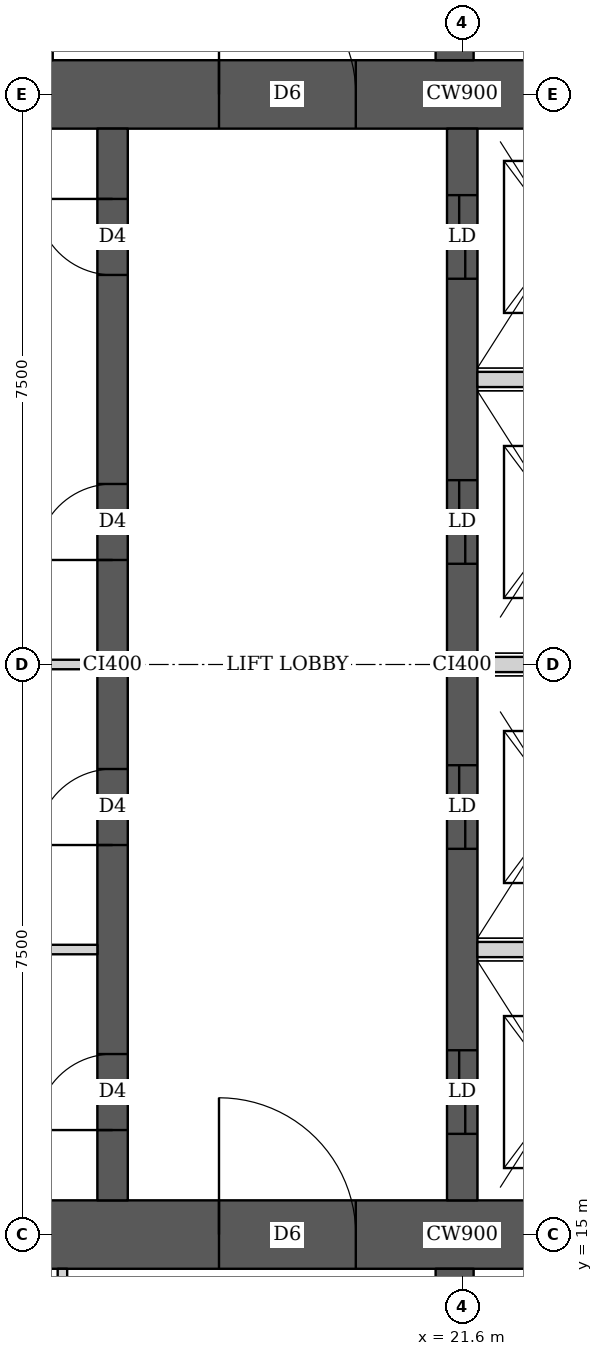
"""IFC4 building model, lengths in metres.
Left out: names, types, materials, properties, quantities, classifications, styles, units other than length and angle.
Written with IfcOpenShell. Run it as: python <this file> out.ifc"""

import sys

from ifc_helpers import new_model, si_unit, direction, frame, frame_2d, origin, place, context, subcontext, project, spatial, rectangle, extrude, element, fill, save


model = new_model("IFC4")
c1 = context("Model", 3, precision=1e-05, world=origin(), true_north=direction((0.0, 1.0)))
c2 = subcontext(c1, "Body", "Model", "MODEL_VIEW")
j1 = project(units=[si_unit("LENGTHUNIT", "METRE"), si_unit("PLANEANGLEUNIT", "RADIAN")], contexts=[c1])
p1 = place(None, origin())
s1 = spatial("IfcSite", under=j1, at=p1, CompositionType="ELEMENT")
p2 = place(p1, origin())
s2 = spatial("IfcBuilding", under=s1, at=p2, CompositionType="ELEMENT")
p3 = place(p2, frame((0.0, 0.0, 139.55)))
s3 = spatial("IfcBuildingStorey", under=s2, at=p3, CompositionType="ELEMENT", Elevation=139.55)
p4 = place(p3, frame((13.95, 15.0, 0.0), z_axis=(0.0, 0.0, 1.0), x_axis=(1.0, 0.0, 0.0)))
e1 = element("IfcWall", 1, at=p4, inside=s3, PredefinedType="SHEAR", context=c2, shape_type="SweptSolid", body=[
    extrude(rectangle(XDim=15.3, YDim=0.9, at=frame_2d((7.65, 0.0))), origin(), (0.0, 0.0, 1.0), 3.75),
])
p5 = place(p4, frame((4.45, 0.0, 0.0)))
e2 = element("IfcOpeningElement", 2, at=p5, cuts=e1, PredefinedType="OPENING", context=c2, shape_type="SweptSolid", body=[
    extrude(rectangle(XDim=1.8, YDim=2.1, at=frame_2d((0.9, 1.05))), frame((0.0, 0.46, 0.0), z_axis=(0.0, -1.0, 0.0), x_axis=(1.0, 0.0, 0.0)), (0.0, 0.0, 1.0), 0.92),
])
p6 = place(p4, frame((10.7, 0.0, 0.0)))
e3 = element("IfcOpeningElement", 3, at=p6, cuts=e1, PredefinedType="OPENING", context=c2, shape_type="SweptSolid", body=[
    extrude(rectangle(XDim=1.1, YDim=2.1, at=frame_2d((0.55, 1.05))), frame((0.0, 0.46, 0.0), z_axis=(0.0, -1.0, 0.0), x_axis=(1.0, 0.0, 0.0)), (0.0, 0.0, 1.0), 0.92),
])
p7 = place(p3, frame((13.95, 30.0, 0.0), z_axis=(0.0, 0.0, 1.0), x_axis=(1.0, 0.0, 0.0)))
e4 = element("IfcWall", 4, at=p7, inside=s3, PredefinedType="SHEAR", context=c2, shape_type="SweptSolid", body=[
    extrude(rectangle(XDim=15.3, YDim=0.9, at=frame_2d((7.65, 0.0))), origin(), (0.0, 0.0, 1.0), 3.75),
])
p8 = place(p7, frame((4.45, 0.0, 0.0)))
e5 = element("IfcOpeningElement", 5, at=p8, cuts=e4, PredefinedType="OPENING", context=c2, shape_type="SweptSolid", body=[
    extrude(rectangle(XDim=1.8, YDim=2.1, at=frame_2d((0.9, 1.05))), frame((0.0, 0.46, 0.0), z_axis=(0.0, -1.0, 0.0), x_axis=(1.0, 0.0, 0.0)), (0.0, 0.0, 1.0), 0.92),
])
p9 = place(p7, frame((10.7, 0.0, 0.0)))
e6 = element("IfcOpeningElement", 6, at=p9, cuts=e4, PredefinedType="OPENING", context=c2, shape_type="SweptSolid", body=[
    extrude(rectangle(XDim=1.1, YDim=2.1, at=frame_2d((0.55, 1.05))), frame((0.0, 0.46, 0.0), z_axis=(0.0, -1.0, 0.0), x_axis=(1.0, 0.0, 0.0)), (0.0, 0.0, 1.0), 0.92),
])
p10 = place(p3, frame((17.0, 15.45, 0.0), z_axis=(0.0, 0.0, 1.0), x_axis=(0.0, 1.0, 0.0)))
e7 = element("IfcWall", 7, at=p10, inside=s3, PredefinedType="SHEAR", context=c2, shape_type="SweptSolid", body=[
    extrude(rectangle(XDim=14.1, YDim=0.4, at=frame_2d((7.05, 0.0))), origin(), (0.0, 0.0, 1.0), 3.75),
])
p11 = place(p10, frame((0.925, 0.0, 0.0)))
e8 = element("IfcOpeningElement", 8, at=p11, cuts=e7, PredefinedType="OPENING", context=c2, shape_type="SweptSolid", body=[
    extrude(rectangle(XDim=1.0, YDim=2.1, at=frame_2d((0.5, 1.05))), frame((0.0, 0.21, 0.0), z_axis=(0.0, -1.0, 0.0), x_axis=(1.0, 0.0, 0.0)), (0.0, 0.0, 1.0), 0.42),
])
p12 = place(p10, frame((4.675, 0.0, 0.0)))
e9 = element("IfcOpeningElement", 9, at=p12, cuts=e7, PredefinedType="OPENING", context=c2, shape_type="SweptSolid", body=[
    extrude(rectangle(XDim=1.0, YDim=2.1, at=frame_2d((0.5, 1.05))), frame((0.0, 0.21, 0.0), z_axis=(0.0, -1.0, 0.0), x_axis=(1.0, 0.0, 0.0)), (0.0, 0.0, 1.0), 0.42),
])
p13 = place(p10, frame((8.425, 0.0, 0.0)))
e10 = element("IfcOpeningElement", 10, at=p13, cuts=e7, PredefinedType="OPENING", context=c2, shape_type="SweptSolid", body=[
    extrude(rectangle(XDim=1.0, YDim=2.1, at=frame_2d((0.5, 1.05))), frame((0.0, 0.21, 0.0), z_axis=(0.0, -1.0, 0.0), x_axis=(1.0, 0.0, 0.0)), (0.0, 0.0, 1.0), 0.42),
])
p14 = place(p10, frame((12.175, 0.0, 0.0)))
e11 = element("IfcOpeningElement", 11, at=p14, cuts=e7, PredefinedType="OPENING", context=c2, shape_type="SweptSolid", body=[
    extrude(rectangle(XDim=1.0, YDim=2.1, at=frame_2d((0.5, 1.05))), frame((0.0, 0.21, 0.0), z_axis=(0.0, -1.0, 0.0), x_axis=(1.0, 0.0, 0.0)), (0.0, 0.0, 1.0), 0.42),
])
p15 = place(p3, frame((21.6, 15.45, 0.0), z_axis=(0.0, 0.0, 1.0), x_axis=(0.0, 1.0, 0.0)))
e12 = element("IfcWall", 12, at=p15, inside=s3, PredefinedType="SHEAR", context=c2, shape_type="SweptSolid", body=[
    extrude(rectangle(XDim=14.1, YDim=0.4, at=frame_2d((7.05, 0.0))), origin(), (0.0, 0.0, 1.0), 3.75),
])
p16 = place(p15, frame((0.875, 0.0, 0.0)))
e13 = element("IfcOpeningElement", 13, at=p16, cuts=e12, PredefinedType="OPENING", context=c2, shape_type="SweptSolid", body=[
    extrude(rectangle(XDim=1.1, YDim=2.1, at=frame_2d((0.55, 1.05))), frame((0.0, 0.21, 0.0), z_axis=(0.0, -1.0, 0.0), x_axis=(1.0, 0.0, 0.0)), (0.0, 0.0, 1.0), 0.42),
])
p17 = place(p15, frame((4.625, 0.0, 0.0)))
e14 = element("IfcOpeningElement", 14, at=p17, cuts=e12, PredefinedType="OPENING", context=c2, shape_type="SweptSolid", body=[
    extrude(rectangle(XDim=1.1, YDim=2.1, at=frame_2d((0.55, 1.05))), frame((0.0, 0.21, 0.0), z_axis=(0.0, -1.0, 0.0), x_axis=(1.0, 0.0, 0.0)), (0.0, 0.0, 1.0), 0.42),
])
p18 = place(p15, frame((8.375, 0.0, 0.0)))
e15 = element("IfcOpeningElement", 15, at=p18, cuts=e12, PredefinedType="OPENING", context=c2, shape_type="SweptSolid", body=[
    extrude(rectangle(XDim=1.1, YDim=2.1, at=frame_2d((0.55, 1.05))), frame((0.0, 0.21, 0.0), z_axis=(0.0, -1.0, 0.0), x_axis=(1.0, 0.0, 0.0)), (0.0, 0.0, 1.0), 0.42),
])
p19 = place(p15, frame((12.125, 0.0, 0.0)))
e16 = element("IfcOpeningElement", 16, at=p19, cuts=e12, PredefinedType="OPENING", context=c2, shape_type="SweptSolid", body=[
    extrude(rectangle(XDim=1.1, YDim=2.1, at=frame_2d((0.55, 1.05))), frame((0.0, 0.21, 0.0), z_axis=(0.0, -1.0, 0.0), x_axis=(1.0, 0.0, 0.0)), (0.0, 0.0, 1.0), 0.42),
])
for number, where, z_axis, x_axis in (
    (17, (21.5, 10.35, 0.0), (0.0, 0.0, 1.0), (0.0, 1.0, 0.0)),
    (18, (21.5, 30.45, 0.0), (0.0, 0.0, 1.0), (0.0, 1.0, 0.0)),
):
    element("IfcWall", number, at=place(p3, frame(where, z_axis=z_axis, x_axis=x_axis)), inside=s3, PredefinedType="SHEAR", context=c2, shape_type="SweptSolid", body=[
        extrude(rectangle(XDim=4.2, YDim=0.5, at=frame_2d((2.1, 0.0))), origin(), (0.0, 0.0, 1.0), 3.75),
    ])
p20 = place(p3, frame((16.34, 10.413, 0.0), z_axis=(0.0, 0.0, 1.0), x_axis=(0.0, 1.0, 0.0)))
e19 = element("IfcWall", 19, at=p20, inside=s3, PredefinedType="PARTITIONING", context=c2, shape_type="SweptSolid", body=[
    extrude(rectangle(XDim=4.137, YDim=0.125, at=frame_2d((2.068, 0.0))), origin(), (0.0, 0.0, 1.0), 3.5),
])
p21 = place(p20, frame((1.512, 0.0, 0.0)))
e20 = element("IfcOpeningElement", 20, at=p21, cuts=e19, PredefinedType="OPENING", context=c2, shape_type="SweptSolid", body=[
    extrude(rectangle(XDim=1.0, YDim=2.1, at=frame_2d((0.5, 1.05))), frame((0.0, 0.073, 0.0), z_axis=(0.0, -1.0, 0.0), x_axis=(1.0, 0.0, 0.0)), (0.0, 0.0, 1.0), 0.145),
])
p22 = place(p3, frame((16.15, 30.45, 0.0), z_axis=(0.0, 0.0, 1.0), x_axis=(0.0, 1.0, 0.0)))
e21 = element("IfcWall", 21, at=p22, inside=s3, PredefinedType="PARTITIONING", context=c2, shape_type="SweptSolid", body=[
    extrude(rectangle(XDim=4.137, YDim=0.125, at=frame_2d((2.068, 0.0))), origin(), (0.0, 0.0, 1.0), 3.5),
])
p23 = place(p22, frame((1.625, 0.0, 0.0)))
e22 = element("IfcOpeningElement", 22, at=p23, cuts=e21, PredefinedType="OPENING", context=c2, shape_type="SweptSolid", body=[
    extrude(rectangle(XDim=1.0, YDim=2.1, at=frame_2d((0.5, 1.05))), frame((0.0, 0.073, 0.0), z_axis=(0.0, -1.0, 0.0), x_axis=(1.0, 0.0, 0.0)), (0.0, 0.0, 1.0), 0.145),
])
for number, where, z_axis, x_axis in (
    (23, (14.85, 18.75, 0.0), (0.0, 0.0, 1.0), (1.0, 0.0, 0.0)),
    (24, (14.85, 22.5, 0.0), (0.0, 0.0, 1.0), (1.0, 0.0, 0.0)),
):
    element("IfcWall", number, at=place(p3, frame(where, z_axis=z_axis, x_axis=x_axis)), inside=s3, PredefinedType="PARTITIONING", context=c2, shape_type="SweptSolid", body=[
        extrude(rectangle(XDim=1.95, YDim=0.125, at=frame_2d((0.975, 0.0))), origin(), (0.0, 0.0, 1.0), 3.5),
    ])
for number, where, z_axis, x_axis in (
    (25, (21.8, 18.75, 0.0), (0.0, 0.0, 1.0), (1.0, 0.0, 0.0)),
    (26, (21.8, 22.5, 0.0), (0.0, 0.0, 1.0), (1.0, 0.0, 0.0)),
    (27, (21.8, 26.25, 0.0), (0.0, 0.0, 1.0), (1.0, 0.0, 0.0)),
):
    element("IfcWall", number, at=place(p3, frame(where, z_axis=z_axis, x_axis=x_axis)), inside=s3, PredefinedType="SOLIDWALL", context=c2, shape_type="SweptSolid", body=[
        extrude(rectangle(XDim=2.2, YDim=0.2, at=frame_2d((1.1, 0.0))), origin(), (0.0, 0.0, 1.0), 3.5),
    ])
p24 = place(p11, origin())
e28 = element("IfcDoor", 28, at=p24, inside=s3, OperationType="SINGLE_SWING_LEFT", PredefinedType="DOOR", context=c2, shape_type="SweptSolid", body=[
    extrude(rectangle(XDim=1.0, YDim=2.1, at=frame_2d((0.5, 1.05))), frame((0.0, 0.025, 0.0), z_axis=(0.0, -1.0, 0.0), x_axis=(1.0, 0.0, 0.0)), (0.0, 0.0, 1.0), 0.05),
])
fill(e8, e28)
p25 = place(p12, origin())
e29 = element("IfcDoor", 29, at=p25, inside=s3, OperationType="SINGLE_SWING_LEFT", PredefinedType="DOOR", context=c2, shape_type="SweptSolid", body=[
    extrude(rectangle(XDim=1.0, YDim=2.1, at=frame_2d((0.5, 1.05))), frame((0.0, 0.025, 0.0), z_axis=(0.0, -1.0, 0.0), x_axis=(1.0, 0.0, 0.0)), (0.0, 0.0, 1.0), 0.05),
])
fill(e9, e29)
p26 = place(p13, origin())
e30 = element("IfcDoor", 30, at=p26, inside=s3, OperationType="SINGLE_SWING_LEFT", PredefinedType="DOOR", context=c2, shape_type="SweptSolid", body=[
    extrude(rectangle(XDim=1.0, YDim=2.1, at=frame_2d((0.5, 1.05))), frame((0.0, 0.025, 0.0), z_axis=(0.0, -1.0, 0.0), x_axis=(1.0, 0.0, 0.0)), (0.0, 0.0, 1.0), 0.05),
])
fill(e10, e30)
p27 = place(p14, origin())
e31 = element("IfcDoor", 31, at=p27, inside=s3, OperationType="SINGLE_SWING_RIGHT", PredefinedType="DOOR", context=c2, shape_type="SweptSolid", body=[
    extrude(rectangle(XDim=1.0, YDim=2.1, at=frame_2d((0.5, 1.05))), frame((0.0, 0.025, 0.0), z_axis=(0.0, -1.0, 0.0), x_axis=(1.0, 0.0, 0.0)), (0.0, 0.0, 1.0), 0.05),
])
fill(e11, e31)
p28 = place(p5, origin())
e32 = element("IfcDoor", 32, at=p28, inside=s3, OperationType="DOUBLE_DOOR_SINGLE_SWING", PredefinedType="DOOR", context=c2, shape_type="SweptSolid", body=[
    extrude(rectangle(XDim=1.8, YDim=2.1, at=frame_2d((0.9, 1.05))), frame((0.0, 0.025, 0.0), z_axis=(0.0, -1.0, 0.0), x_axis=(1.0, 0.0, 0.0)), (0.0, 0.0, 1.0), 0.05),
])
fill(e2, e32)
p29 = place(p8, origin())
e33 = element("IfcDoor", 33, at=p29, inside=s3, OperationType="DOUBLE_DOOR_SINGLE_SWING", PredefinedType="DOOR", context=c2, shape_type="SweptSolid", body=[
    extrude(rectangle(XDim=1.8, YDim=2.1, at=frame_2d((0.9, 1.05))), frame((0.0, 0.025, 0.0), z_axis=(0.0, -1.0, 0.0), x_axis=(1.0, 0.0, 0.0)), (0.0, 0.0, 1.0), 0.05),
])
fill(e5, e33)
p30 = place(p16, origin())
e34 = element("IfcDoor", 34, at=p30, inside=s3, OperationType="DOUBLE_DOOR_SLIDING", PredefinedType="DOOR", context=c2, shape_type="SweptSolid", body=[
    extrude(rectangle(XDim=1.1, YDim=2.1, at=frame_2d((0.55, 1.05))), frame((0.0, 0.025, 0.0), z_axis=(0.0, -1.0, 0.0), x_axis=(1.0, 0.0, 0.0)), (0.0, 0.0, 1.0), 0.05),
])
fill(e13, e34)
p31 = place(p17, origin())
e35 = element("IfcDoor", 35, at=p31, inside=s3, OperationType="DOUBLE_DOOR_SLIDING", PredefinedType="DOOR", context=c2, shape_type="SweptSolid", body=[
    extrude(rectangle(XDim=1.1, YDim=2.1, at=frame_2d((0.55, 1.05))), frame((0.0, 0.025, 0.0), z_axis=(0.0, -1.0, 0.0), x_axis=(1.0, 0.0, 0.0)), (0.0, 0.0, 1.0), 0.05),
])
fill(e14, e35)
p32 = place(p18, origin())
e36 = element("IfcDoor", 36, at=p32, inside=s3, OperationType="DOUBLE_DOOR_SLIDING", PredefinedType="DOOR", context=c2, shape_type="SweptSolid", body=[
    extrude(rectangle(XDim=1.1, YDim=2.1, at=frame_2d((0.55, 1.05))), frame((0.0, 0.025, 0.0), z_axis=(0.0, -1.0, 0.0), x_axis=(1.0, 0.0, 0.0)), (0.0, 0.0, 1.0), 0.05),
])
fill(e15, e36)
p33 = place(p19, origin())
e37 = element("IfcDoor", 37, at=p33, inside=s3, OperationType="DOUBLE_DOOR_SLIDING", PredefinedType="DOOR", context=c2, shape_type="SweptSolid", body=[
    extrude(rectangle(XDim=1.1, YDim=2.1, at=frame_2d((0.55, 1.05))), frame((0.0, 0.025, 0.0), z_axis=(0.0, -1.0, 0.0), x_axis=(1.0, 0.0, 0.0)), (0.0, 0.0, 1.0), 0.05),
])
fill(e16, e37)
save(model, sys.argv[1])
